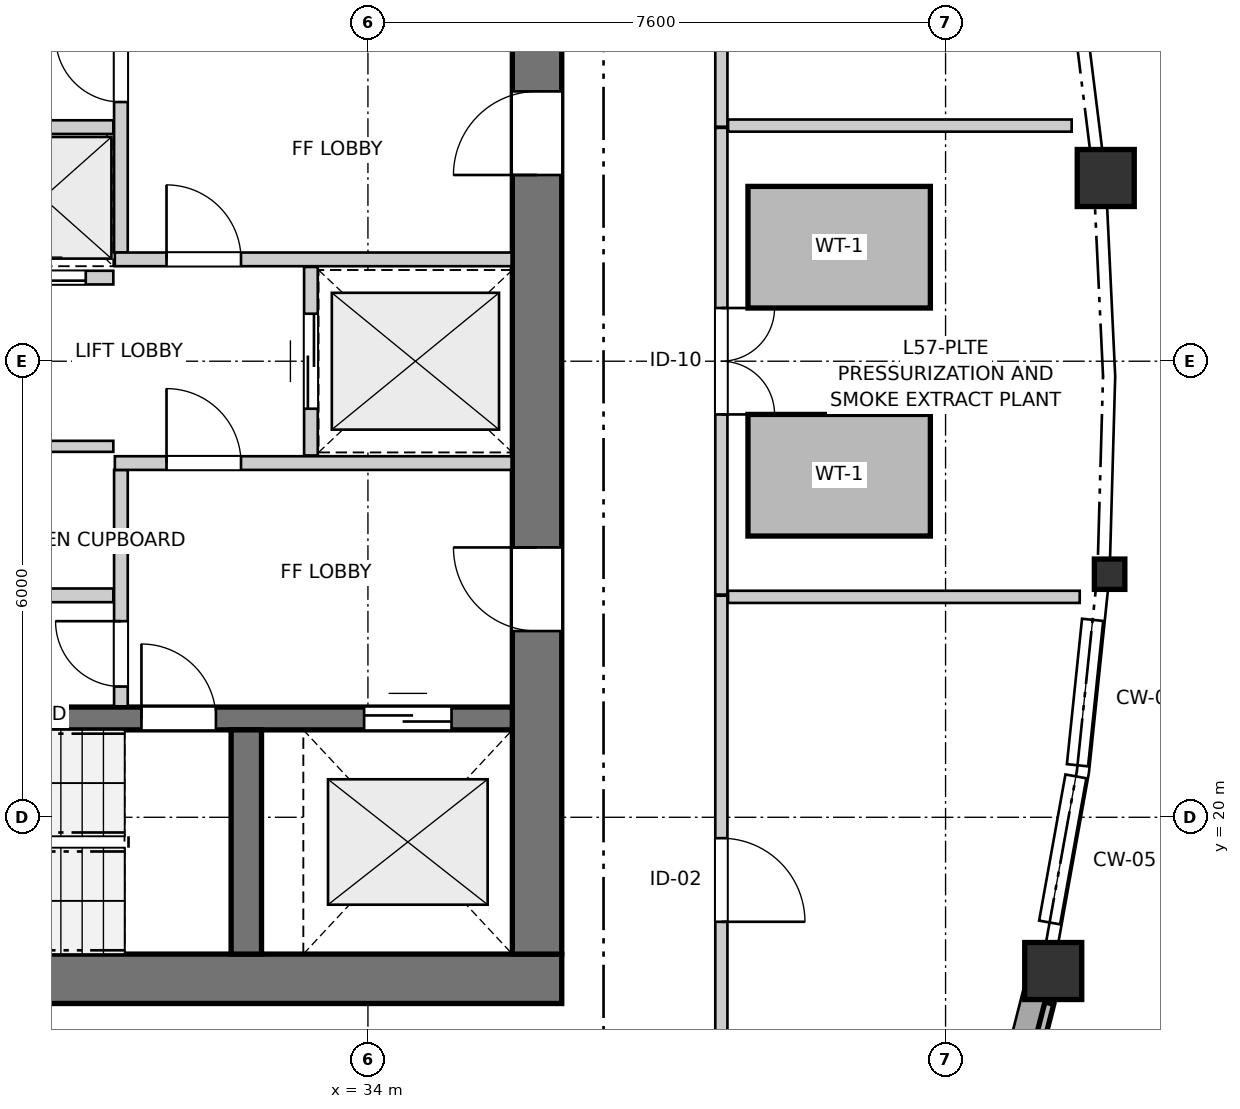
"""IFC4 building model, lengths in metres.
Left out: names, types, materials, properties, quantities, classifications, styles, units other than length and angle.
Written with IfcOpenShell. Run it as: python <this file> out.ifc"""

import sys

from ifc_helpers import new_model, si_unit, direction, frame, frame_2d, origin, origin_2d, place, context, subcontext, project, spatial, rectangle, i_section, extrude, source, transform, mapped, element, fill, save


model = new_model("IFC4")
c1 = context("Model", 3, precision=1e-05, world=origin(), true_north=direction((0.0, 1.0)))
c2 = subcontext(c1, "Body", "Model", "MODEL_VIEW")
j1 = project(units=[si_unit("LENGTHUNIT", "METRE"), si_unit("PLANEANGLEUNIT", "RADIAN")], contexts=[c1])
p1 = place(None, origin())
s1 = spatial("IfcSite", under=j1, at=p1, CompositionType="ELEMENT")
p2 = place(p1, origin())
s2 = spatial("IfcBuilding", under=s1, at=p2, CompositionType="ELEMENT")
p3 = place(p2, frame((0.0, 0.0, 190.6)))
s3 = spatial("IfcBuildingStorey", under=s2, at=p3, CompositionType="ELEMENT", Elevation=190.6)
p4 = place(p3, frame((24.15, 17.875, 0.0), z_axis=(0.0, 0.0, 1.0), x_axis=(1.0, 0.0, 0.0)))
e1 = element("IfcWall", 1, at=p4, inside=s3, PredefinedType="SHEAR", context=c2, shape_type="SweptSolid", body=[
    extrude(rectangle(XDim=12.4, YDim=0.65, at=frame_2d((6.2, 0.0))), origin(), (0.0, 0.0, 1.0), 4.76),
])
p5 = place(p3, frame((36.225, 18.2, 0.0), z_axis=(0.0, 0.0, 1.0), x_axis=(0.0, 1.0, 0.0)))
e2 = element("IfcWall", 2, at=p5, inside=s3, PredefinedType="SHEAR", context=c2, shape_type="SweptSolid", body=[
    extrude(rectangle(XDim=15.6, YDim=0.65, at=frame_2d((7.8, 0.0))), origin(), (0.0, 0.0, 1.0), 4.76),
])
p6 = place(p5, frame((4.25, 0.0, 0.0)))
e3 = element("IfcOpeningElement", 3, at=p6, cuts=e2, PredefinedType="OPENING", context=c2, shape_type="SweptSolid", body=[
    extrude(rectangle(XDim=1.1, YDim=2.15, at=frame_2d((0.55, 1.075))), frame((0.0, 0.335, 0.0), z_axis=(0.0, -1.0, 0.0), x_axis=(1.0, 0.0, 0.0)), (0.0, 0.0, 1.0), 0.67),
])
p7 = place(p5, frame((10.25, 0.0, 0.0)))
e4 = element("IfcOpeningElement", 4, at=p7, cuts=e2, PredefinedType="OPENING", context=c2, shape_type="SweptSolid", body=[
    extrude(rectangle(XDim=1.1, YDim=2.15, at=frame_2d((0.55, 1.075))), frame((0.0, 0.335, 0.0), z_axis=(0.0, -1.0, 0.0), x_axis=(1.0, 0.0, 0.0)), (0.0, 0.0, 1.0), 0.67),
])
p8 = place(p3, frame((24.8, 21.3, 0.0), z_axis=(0.0, 0.0, 1.0), x_axis=(1.0, 0.0, 0.0)))
e5 = element("IfcWall", 5, at=p8, inside=s3, PredefinedType="SHEAR", context=c2, shape_type="SweptSolid", body=[
    extrude(rectangle(XDim=11.1, YDim=0.3, at=frame_2d((5.55, 0.0))), origin(), (0.0, 0.0, 1.0), 4.76),
])
p9 = place(p8, frame((6.22, 0.0, 0.0)))
e6 = element("IfcOpeningElement", 6, at=p9, cuts=e5, PredefinedType="OPENING", context=c2, shape_type="SweptSolid", body=[
    extrude(rectangle(XDim=0.98, YDim=2.15, at=frame_2d((0.49, 1.075))), frame((0.0, 0.16, 0.0), z_axis=(0.0, -1.0, 0.0), x_axis=(1.0, 0.0, 0.0)), (0.0, 0.0, 1.0), 0.32),
])
p10 = place(p8, frame((9.15, 0.0, 0.0)))
e7 = element("IfcOpeningElement", 7, at=p10, cuts=e5, PredefinedType="OPENING", context=c2, shape_type="SweptSolid", body=[
    extrude(rectangle(XDim=1.15, YDim=2.15, at=frame_2d((0.575, 1.075))), frame((0.0, 0.16, 0.0), z_axis=(0.0, -1.0, 0.0), x_axis=(1.0, 0.0, 0.0)), (0.0, 0.0, 1.0), 0.32),
])
p11 = place(p3, frame((32.4, 18.2, 0.0), z_axis=(0.0, 0.0, 1.0), x_axis=(0.0, 1.0, 0.0)))
e8 = element("IfcWall", 8, at=p11, inside=s3, PredefinedType="SHEAR", context=c2, shape_type="SweptSolid", body=[
    extrude(rectangle(XDim=2.95, YDim=0.4, at=frame_2d((1.475, 0.0))), origin(), (0.0, 0.0, 1.0), 4.76),
])
m1 = source(origin(), c2, "Body", "SweptSolid", [
    extrude(rectangle(XDim=0.75, YDim=0.75, at=origin_2d()), origin(), (0.0, 0.0, 1.0), 4.76),
])
p12 = place(p3, frame((43.017, 17.977, 0.0), z_axis=(0.0, 0.0, 1.0), x_axis=(1.0, 0.0, 0.0)))
e9 = element("IfcColumn", 9, at=p12, inside=s3, PredefinedType="COLUMN", context=c2, shape_type="MappedRepresentation", body=[
    mapped(m1, transform((0.0, 0.0, 0.0), x_axis=(1.0, 0.0, 0.0), y_axis=(0.0, 1.0, 0.0), z_axis=(0.0, 0.0, 1.0), scale=1.0)),
])
m2 = source(origin(), c2, "Body", "SweptSolid", [
    extrude(i_section(OverallWidth=0.401, OverallDepth=0.399, WebThickness=0.023, FlangeThickness=0.036, FilletRadius=0.015, at=origin_2d()), origin(), (0.0, 0.0, 1.0), 4.76),
])
p13 = place(p3, frame((43.758, 23.198, 0.0), z_axis=(0.0, 0.0, 1.0), x_axis=(1.0, 0.0, 0.0)))
e10 = element("IfcColumn", 10, at=p13, inside=s3, PredefinedType="PILASTER", context=c2, shape_type="MappedRepresentation", body=[
    mapped(m2, transform((0.0, 0.0, 0.0), x_axis=(1.0, 0.0, 0.0), y_axis=(0.0, 1.0, 0.0), z_axis=(0.0, 0.0, 1.0), scale=1.0)),
])
p14 = place(p3, frame((43.708, 28.41, 0.0), z_axis=(0.0, 0.0, 1.0), x_axis=(1.0, 0.0, 0.0)))
e11 = element("IfcColumn", 11, at=p14, inside=s3, PredefinedType="COLUMN", context=c2, shape_type="MappedRepresentation", body=[
    mapped(m1, transform((0.0, 0.0, 0.0), x_axis=(1.0, 0.0, 0.0), y_axis=(0.0, 1.0, 0.0), z_axis=(0.0, 0.0, 1.0), scale=1.0)),
])
p15 = place(p3, frame((42.184, 15.367, 0.0), z_axis=(0.0, 0.0, 1.0), x_axis=(0.247650778908, 0.968849364817, 0.0)))
e12 = element("IfcWall", 12, at=p15, inside=s3, PredefinedType="SOLIDWALL", context=c2, shape_type="SweptSolid", body=[
    extrude(rectangle(XDim=2.57, YDim=0.32, at=frame_2d((1.285, 0.0))), origin(), (0.0, 0.0, 1.0), 4.34),
])
p16 = place(p3, frame((30.75, 21.46, 0.0), z_axis=(0.0, 0.0, 1.0), x_axis=(0.0, 1.0, 0.0)))
e13 = element("IfcWall", 13, at=p16, inside=s3, PredefinedType="PARTITIONING", context=c2, shape_type="SweptSolid", body=[
    extrude(rectangle(XDim=3.11, YDim=0.18, at=frame_2d((1.555, 0.0))), origin(), (0.0, 0.0, 1.0), 4.76),
])
p17 = place(p16, frame((0.26, 0.0, 0.0)))
e14 = element("IfcOpeningElement", 14, at=p17, cuts=e13, PredefinedType="OPENING", context=c2, shape_type="SweptSolid", body=[
    extrude(rectangle(XDim=0.86, YDim=2.05, at=frame_2d((0.43, 1.025))), frame((0.0, 0.1, 0.0), z_axis=(0.0, -1.0, 0.0), x_axis=(1.0, 0.0, 0.0)), (0.0, 0.0, 1.0), 0.2),
])
p18 = place(p3, frame((30.67, 24.66, 0.0), z_axis=(0.0, 0.0, 1.0), x_axis=(1.0, 0.0, 0.0)))
e15 = element("IfcWall", 15, at=p18, inside=s3, PredefinedType="PARTITIONING", context=c2, shape_type="SweptSolid", body=[
    extrude(rectangle(XDim=5.22, YDim=0.18, at=frame_2d((2.61, 0.0))), origin(), (0.0, 0.0, 1.0), 4.76),
])
p19 = place(p18, frame((0.68, 0.0, 0.0)))
e16 = element("IfcOpeningElement", 16, at=p19, cuts=e15, PredefinedType="OPENING", context=c2, shape_type="SweptSolid", body=[
    extrude(rectangle(XDim=0.98, YDim=2.15, at=frame_2d((0.49, 1.075))), frame((0.0, 0.1, 0.0), z_axis=(0.0, -1.0, 0.0), x_axis=(1.0, 0.0, 0.0)), (0.0, 0.0, 1.0), 0.2),
])
p20 = place(p3, frame((30.75, 27.43, 0.0), z_axis=(0.0, 0.0, 1.0), x_axis=(0.0, 1.0, 0.0)))
e17 = element("IfcWall", 17, at=p20, inside=s3, PredefinedType="PARTITIONING", context=c2, shape_type="SweptSolid", body=[
    extrude(rectangle(XDim=3.11, YDim=0.18, at=frame_2d((1.555, 0.0))), origin(), (0.0, 0.0, 1.0), 4.76),
])
p21 = place(p20, frame((1.98, 0.0, 0.0)))
e18 = element("IfcOpeningElement", 18, at=p21, cuts=e17, PredefinedType="OPENING", context=c2, shape_type="SweptSolid", body=[
    extrude(rectangle(XDim=0.86, YDim=2.05, at=frame_2d((0.43, 1.025))), frame((0.0, 0.1, 0.0), z_axis=(0.0, -1.0, 0.0), x_axis=(1.0, 0.0, 0.0)), (0.0, 0.0, 1.0), 0.2),
])
p22 = place(p3, frame((30.67, 27.34, 0.0), z_axis=(0.0, 0.0, 1.0), x_axis=(1.0, 0.0, 0.0)))
e19 = element("IfcWall", 19, at=p22, inside=s3, PredefinedType="PARTITIONING", context=c2, shape_type="SweptSolid", body=[
    extrude(rectangle(XDim=5.22, YDim=0.18, at=frame_2d((2.61, 0.0))), origin(), (0.0, 0.0, 1.0), 4.76),
])
p23 = place(p22, frame((0.68, 0.0, 0.0)))
e20 = element("IfcOpeningElement", 20, at=p23, cuts=e19, PredefinedType="OPENING", context=c2, shape_type="SweptSolid", body=[
    extrude(rectangle(XDim=0.98, YDim=2.15, at=frame_2d((0.49, 1.075))), frame((0.0, 0.1, 0.0), z_axis=(0.0, -1.0, 0.0), x_axis=(1.0, 0.0, 0.0)), (0.0, 0.0, 1.0), 0.2),
])
p24 = place(p3, frame((33.25, 24.76, 0.0), z_axis=(0.0, 0.0, 1.0), x_axis=(0.0, 1.0, 0.0)))
e21 = element("IfcWall", 21, at=p24, inside=s3, PredefinedType="PARTITIONING", context=c2, shape_type="SweptSolid", body=[
    extrude(rectangle(XDim=2.48, YDim=0.18, at=frame_2d((1.24, 0.0))), origin(), (0.0, 0.0, 1.0), 4.76),
])
p25 = place(p24, frame((0.615, 0.0, 0.0)))
e22 = element("IfcOpeningElement", 22, at=p25, cuts=e21, PredefinedType="OPENING", context=c2, shape_type="SweptSolid", body=[
    extrude(rectangle(XDim=1.25, YDim=2.15, at=frame_2d((0.625, 1.075))), frame((0.0, 0.1, 0.0), z_axis=(0.0, -1.0, 0.0), x_axis=(1.0, 0.0, 0.0)), (0.0, 0.0, 1.0), 0.2),
])
p26 = place(p3, frame((24.81, 22.92, 0.0), z_axis=(0.0, 0.0, 1.0), x_axis=(1.0, 0.0, 0.0)))
e23 = element("IfcWall", 23, at=p26, inside=s3, PredefinedType="PARTITIONING", context=c2, shape_type="SweptSolid", body=[
    extrude(rectangle(XDim=5.84, YDim=0.18, at=frame_2d((2.92, 0.0))), origin(), (0.0, 0.0, 1.0), 4.76),
])
p27 = place(p3, frame((28.13, 24.88, 0.0), z_axis=(0.0, 0.0, 1.0), x_axis=(1.0, 0.0, 0.0)))
e24 = element("IfcWall", 24, at=p27, inside=s3, PredefinedType="PARTITIONING", context=c2, shape_type="SweptSolid", body=[
    extrude(rectangle(XDim=2.52, YDim=0.145, at=frame_2d((1.26, 0.0))), origin(), (0.0, 0.0, 1.0), 4.76),
])
p28 = place(p27, frame((0.82, 0.0, 0.0)))
e25 = element("IfcOpeningElement", 25, at=p28, cuts=e24, PredefinedType="OPENING", context=c2, shape_type="SweptSolid", body=[
    extrude(rectangle(XDim=0.86, YDim=2.05, at=frame_2d((0.43, 1.025))), frame((0.0, 0.083, 0.0), z_axis=(0.0, -1.0, 0.0), x_axis=(1.0, 0.0, 0.0)), (0.0, 0.0, 1.0), 0.165),
])
p29 = place(p3, frame((24.81, 29.08, 0.0), z_axis=(0.0, 0.0, 1.0), x_axis=(1.0, 0.0, 0.0)))
e26 = element("IfcWall", 26, at=p29, inside=s3, PredefinedType="PARTITIONING", context=c2, shape_type="SweptSolid", body=[
    extrude(rectangle(XDim=5.84, YDim=0.18, at=frame_2d((2.92, 0.0))), origin(), (0.0, 0.0, 1.0), 4.76),
])
p30 = place(p3, frame((28.825, 27.1, 0.0), z_axis=(0.0, 0.0, 1.0), x_axis=(1.0, 0.0, 0.0)))
e27 = element("IfcWall", 27, at=p30, inside=s3, PredefinedType="PARTITIONING", context=c2, shape_type="SweptSolid", body=[
    extrude(rectangle(XDim=1.825, YDim=0.18, at=frame_2d((0.913, 0.0))), origin(), (0.0, 0.0, 1.0), 4.76),
])
p31 = place(p30, frame((0.363, 0.0, 0.0)))
e28 = element("IfcOpeningElement", 28, at=p31, cuts=e27, PredefinedType="OPENING", context=c2, shape_type="SweptSolid", body=[
    extrude(rectangle(XDim=1.1, YDim=2.15, at=frame_2d((0.55, 1.075))), frame((0.0, 0.1, 0.0), z_axis=(0.0, -1.0, 0.0), x_axis=(1.0, 0.0, 0.0)), (0.0, 0.0, 1.0), 0.2),
])
p32 = place(p3, frame((38.65, 22.915, 0.0), z_axis=(0.0, 0.0, 1.0), x_axis=(0.0, -1.0, 0.0)))
e29 = element("IfcWall", 29, at=p32, inside=s3, PredefinedType="PARTITIONING", context=c2, shape_type="SweptSolid", body=[
    extrude(rectangle(XDim=7.377, YDim=0.16, at=frame_2d((3.688, 0.0))), origin(), (0.0, 0.0, 1.0), 4.228),
])
p33 = place(p32, frame((3.19, 0.0, 0.0)))
e30 = element("IfcOpeningElement", 30, at=p33, cuts=e29, PredefinedType="OPENING", context=c2, shape_type="SweptSolid", body=[
    extrude(rectangle(XDim=1.1, YDim=2.15, at=frame_2d((0.55, 1.075))), frame((0.0, 0.09, 0.0), z_axis=(0.0, -1.0, 0.0), x_axis=(1.0, 0.0, 0.0)), (0.0, 0.0, 1.0), 0.18),
])
p34 = place(p3, frame((38.65, 36.462, 0.0), z_axis=(0.0, 0.0, 1.0), x_axis=(0.0, -1.0, 0.0)))
e31 = element("IfcWall", 31, at=p34, inside=s3, PredefinedType="PARTITIONING", context=c2, shape_type="SweptSolid", body=[
    extrude(rectangle(XDim=7.377, YDim=0.16, at=frame_2d((3.688, 0.0))), origin(), (0.0, 0.0, 1.0), 4.228),
])
p35 = place(p34, frame((3.087, 0.0, 0.0)))
e32 = element("IfcOpeningElement", 32, at=p35, cuts=e31, PredefinedType="OPENING", context=c2, shape_type="SweptSolid", body=[
    extrude(rectangle(XDim=1.1, YDim=2.15, at=frame_2d((0.55, 1.075))), frame((0.0, 0.09, 0.0), z_axis=(0.0, -1.0, 0.0), x_axis=(1.0, 0.0, 0.0)), (0.0, 0.0, 1.0), 0.18),
])
p36 = place(p3, frame((38.65, 29.07, 0.0), z_axis=(0.0, 0.0, 1.0), x_axis=(0.0, -1.0, 0.0)))
e33 = element("IfcWall", 33, at=p36, inside=s3, PredefinedType="PARTITIONING", context=c2, shape_type="SweptSolid", body=[
    extrude(rectangle(XDim=6.14, YDim=0.16, at=frame_2d((3.07, 0.0))), origin(), (0.0, 0.0, 1.0), 4.228),
])
p37 = place(p36, frame((2.37, 0.0, 0.0)))
e34 = element("IfcOpeningElement", 34, at=p37, cuts=e33, PredefinedType="OPENING", context=c2, shape_type="SweptSolid", body=[
    extrude(rectangle(XDim=1.4, YDim=2.15, at=frame_2d((0.7, 1.075))), frame((0.0, 0.09, 0.0), z_axis=(0.0, -1.0, 0.0), x_axis=(1.0, 0.0, 0.0)), (0.0, 0.0, 1.0), 0.18),
])
p38 = place(p3, frame((38.738, 22.9, 0.0), z_axis=(0.0, 0.0, 1.0), x_axis=(1.0, 0.0, 0.0)))
e35 = element("IfcWall", 35, at=p38, inside=s3, PredefinedType="PARTITIONING", context=c2, shape_type="SweptSolid", body=[
    extrude(rectangle(XDim=4.627, YDim=0.16, at=frame_2d((2.313, 0.0))), origin(), (0.0, 0.0, 1.0), 2.928),
])
p39 = place(p3, frame((38.738, 29.1, 0.0), z_axis=(0.0, 0.0, 1.0), x_axis=(1.0, 0.0, 0.0)))
e36 = element("IfcWall", 36, at=p39, inside=s3, PredefinedType="PARTITIONING", context=c2, shape_type="SweptSolid", body=[
    extrude(rectangle(XDim=4.521, YDim=0.16, at=frame_2d((2.26, 0.0))), origin(), (0.0, 0.0, 1.0), 4.76),
])
m3 = source(origin(), c2, "Body", "SweptSolid", [
    extrude(rectangle(XDim=0.98, YDim=2.15, at=frame_2d((0.49, 1.075))), frame((0.0, 0.025, 0.0), z_axis=(0.0, -1.0, 0.0), x_axis=(1.0, 0.0, 0.0)), (0.0, 0.0, 1.0), 0.05),
])
p40 = place(p9, origin())
e37 = element("IfcDoor", 37, at=p40, inside=s3, OperationType="SINGLE_SWING_LEFT", PredefinedType="DOOR", context=c2, shape_type="MappedRepresentation", body=[
    mapped(m3, transform((0.0, 0.0, 0.0), x_axis=(1.0, 0.0, 0.0), y_axis=(0.0, 1.0, 0.0), z_axis=(0.0, 0.0, 1.0), scale=1.0)),
])
fill(e6, e37)
m4 = source(origin(), c2, "Body", "SweptSolid", [
    extrude(rectangle(XDim=1.15, YDim=2.15, at=frame_2d((0.575, 1.075))), frame((0.0, 0.025, 0.0), z_axis=(0.0, -1.0, 0.0), x_axis=(1.0, 0.0, 0.0)), (0.0, 0.0, 1.0), 0.05),
])
p41 = place(p10, origin())
e38 = element("IfcDoor", 38, at=p41, inside=s3, OperationType="DOUBLE_DOOR_SLIDING", PredefinedType="DOOR", context=c2, shape_type="MappedRepresentation", body=[
    mapped(m4, transform((0.0, 0.0, 0.0), x_axis=(1.0, 0.0, 0.0), y_axis=(0.0, 1.0, 0.0), z_axis=(0.0, 0.0, 1.0), scale=1.0)),
])
fill(e7, e38)
m5 = source(origin(), c2, "Body", "SweptSolid", [
    extrude(rectangle(XDim=1.1, YDim=2.15, at=frame_2d((0.55, 1.075))), frame((0.0, 0.025, 0.0), z_axis=(0.0, -1.0, 0.0), x_axis=(1.0, 0.0, 0.0)), (0.0, 0.0, 1.0), 0.05),
])
p42 = place(p6, origin())
e39 = element("IfcDoor", 39, at=p42, inside=s3, OperationType="SINGLE_SWING_RIGHT", PredefinedType="DOOR", context=c2, shape_type="MappedRepresentation", body=[
    mapped(m5, transform((0.0, 0.0, 0.0), x_axis=(1.0, 0.0, 0.0), y_axis=(0.0, 1.0, 0.0), z_axis=(0.0, 0.0, 1.0), scale=1.0)),
])
fill(e3, e39)
p43 = place(p7, origin())
e40 = element("IfcDoor", 40, at=p43, inside=s3, OperationType="SINGLE_SWING_LEFT", PredefinedType="DOOR", context=c2, shape_type="MappedRepresentation", body=[
    mapped(m5, transform((0.0, 0.0, 0.0), x_axis=(1.0, 0.0, 0.0), y_axis=(0.0, 1.0, 0.0), z_axis=(0.0, 0.0, 1.0), scale=1.0)),
])
fill(e4, e40)
m6 = source(origin(), c2, "Body", "SweptSolid", [
    extrude(rectangle(XDim=0.86, YDim=2.05, at=frame_2d((0.43, 1.025))), frame((0.0, 0.025, 0.0), z_axis=(0.0, -1.0, 0.0), x_axis=(1.0, 0.0, 0.0)), (0.0, 0.0, 1.0), 0.05),
])
p44 = place(p17, origin())
e41 = element("IfcDoor", 41, at=p44, inside=s3, OperationType="SINGLE_SWING_RIGHT", PredefinedType="DOOR", context=c2, shape_type="MappedRepresentation", body=[
    mapped(m6, transform((0.0, 0.0, 0.0), x_axis=(1.0, 0.0, 0.0), y_axis=(0.0, 1.0, 0.0), z_axis=(0.0, 0.0, 1.0), scale=1.0)),
])
fill(e14, e41)
p45 = place(p19, origin())
e42 = element("IfcDoor", 42, at=p45, inside=s3, OperationType="SINGLE_SWING_LEFT", PredefinedType="DOOR", context=c2, shape_type="MappedRepresentation", body=[
    mapped(m3, transform((0.0, 0.0, 0.0), x_axis=(1.0, 0.0, 0.0), y_axis=(0.0, 1.0, 0.0), z_axis=(0.0, 0.0, 1.0), scale=1.0)),
])
fill(e16, e42)
p46 = place(p21, origin())
e43 = element("IfcDoor", 43, at=p46, inside=s3, OperationType="SINGLE_SWING_RIGHT", PredefinedType="DOOR", context=c2, shape_type="MappedRepresentation", body=[
    mapped(m6, transform((0.0, 0.0, 0.0), x_axis=(1.0, 0.0, 0.0), y_axis=(0.0, 1.0, 0.0), z_axis=(0.0, 0.0, 1.0), scale=1.0)),
])
fill(e18, e43)
p47 = place(p23, origin())
e44 = element("IfcDoor", 44, at=p47, inside=s3, OperationType="SINGLE_SWING_LEFT", PredefinedType="DOOR", context=c2, shape_type="MappedRepresentation", body=[
    mapped(m3, transform((0.0, 0.0, 0.0), x_axis=(1.0, 0.0, 0.0), y_axis=(0.0, 1.0, 0.0), z_axis=(0.0, 0.0, 1.0), scale=1.0)),
])
fill(e20, e44)
m7 = source(origin(), c2, "Body", "SweptSolid", [
    extrude(rectangle(XDim=1.25, YDim=2.15, at=frame_2d((0.625, 1.075))), frame((0.0, 0.025, 0.0), z_axis=(0.0, -1.0, 0.0), x_axis=(1.0, 0.0, 0.0)), (0.0, 0.0, 1.0), 0.05),
])
p48 = place(p25, origin())
e45 = element("IfcDoor", 45, at=p48, inside=s3, OperationType="DOUBLE_DOOR_SLIDING", PredefinedType="DOOR", context=c2, shape_type="MappedRepresentation", body=[
    mapped(m7, transform((0.0, 0.0, 0.0), x_axis=(1.0, 0.0, 0.0), y_axis=(0.0, 1.0, 0.0), z_axis=(0.0, 0.0, 1.0), scale=1.0)),
])
fill(e22, e45)
p49 = place(p31, origin())
e46 = element("IfcDoor", 46, at=p49, inside=s3, OperationType="DOUBLE_DOOR_SLIDING", PredefinedType="DOOR", context=c2, shape_type="MappedRepresentation", body=[
    mapped(m5, transform((0.0, 0.0, 0.0), x_axis=(1.0, 0.0, 0.0), y_axis=(0.0, 1.0, 0.0), z_axis=(0.0, 0.0, 1.0), scale=1.0)),
])
fill(e28, e46)
p50 = place(p33, origin())
e47 = element("IfcDoor", 47, at=p50, inside=s3, OperationType="SINGLE_SWING_RIGHT", PredefinedType="DOOR", context=c2, shape_type="MappedRepresentation", body=[
    mapped(m5, transform((0.0, 0.0, 0.0), x_axis=(1.0, 0.0, 0.0), y_axis=(0.0, 1.0, 0.0), z_axis=(0.0, 0.0, 1.0), scale=1.0)),
])
fill(e30, e47)
m8 = source(origin(), c2, "Body", "SweptSolid", [
    extrude(rectangle(XDim=1.4, YDim=2.15, at=frame_2d((0.7, 1.075))), frame((0.0, 0.025, 0.0), z_axis=(0.0, -1.0, 0.0), x_axis=(1.0, 0.0, 0.0)), (0.0, 0.0, 1.0), 0.05),
])
p51 = place(p37, origin())
e48 = element("IfcDoor", 48, at=p51, inside=s3, OperationType="DOUBLE_DOOR_SINGLE_SWING", PredefinedType="DOOR", context=c2, shape_type="MappedRepresentation", body=[
    mapped(m8, transform((0.0, 0.0, 0.0), x_axis=(1.0, 0.0, 0.0), y_axis=(0.0, 1.0, 0.0), z_axis=(0.0, 0.0, 1.0), scale=1.0)),
])
fill(e34, e48)
save(model, sys.argv[1])
